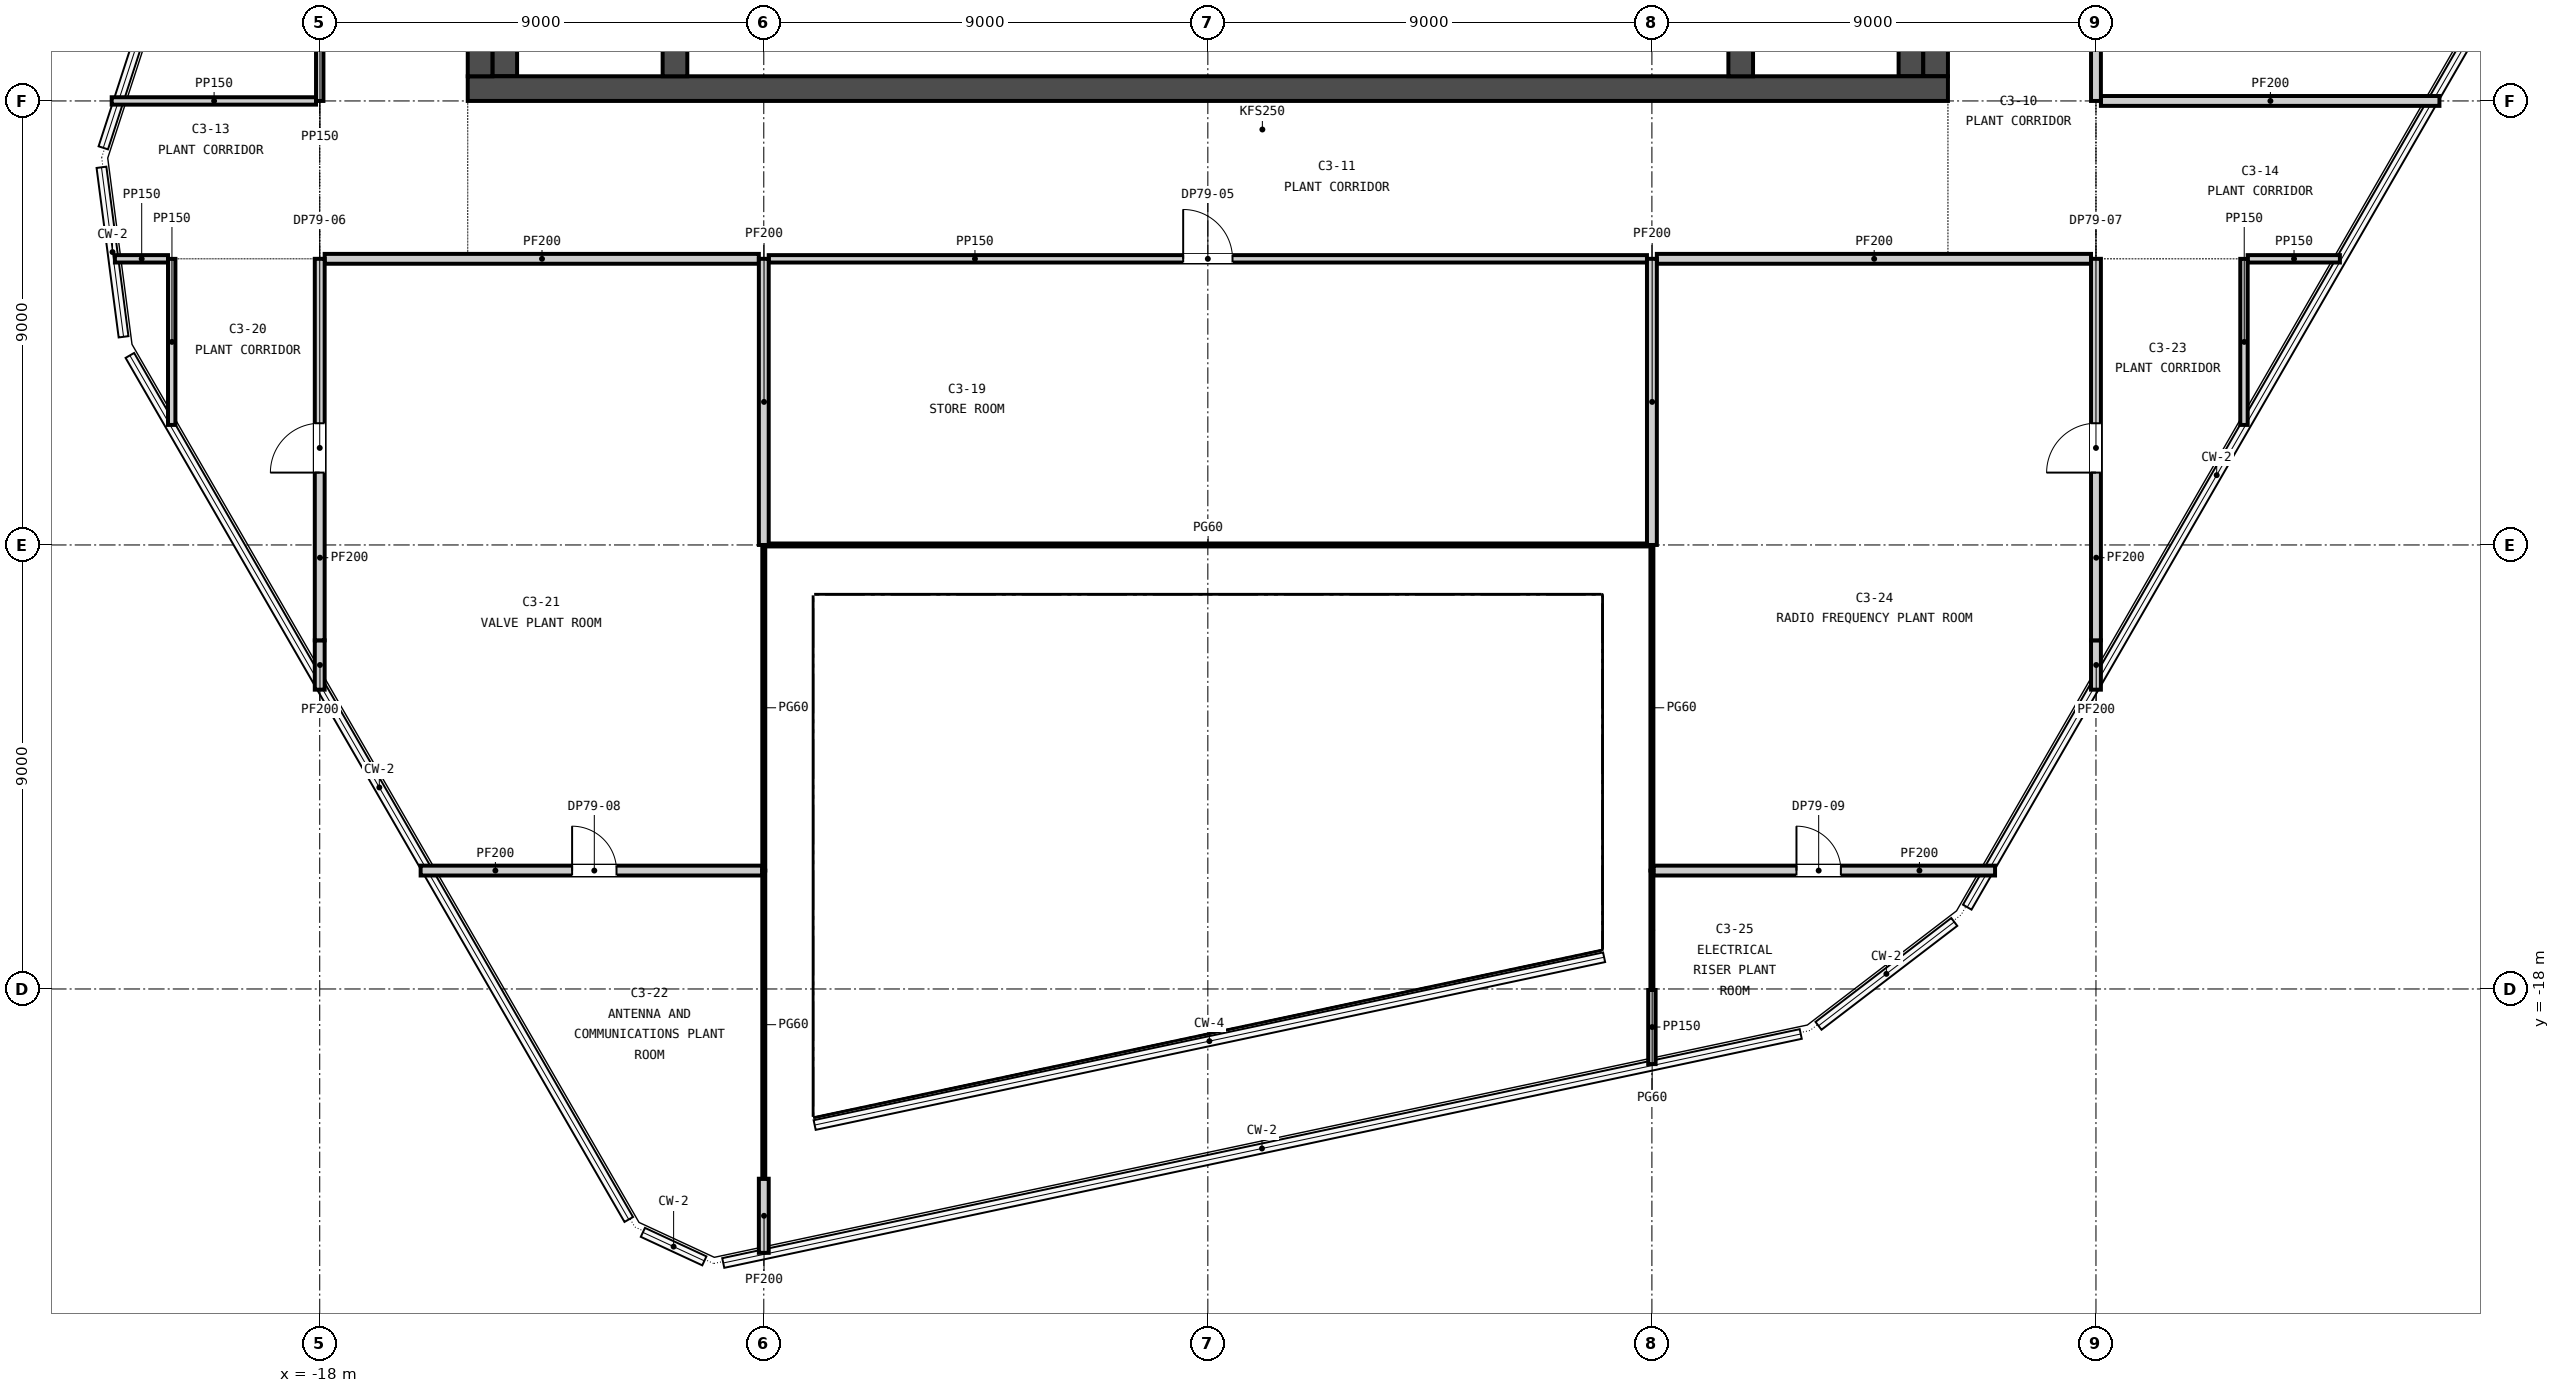
"""IFC4 building model, lengths in metres.
Left out: names, types, materials, properties, quantities, classifications, styles, units other than length and angle.
Written with IfcOpenShell. Run it as: python <this file> out.ifc"""

import sys

from ifc_helpers import new_model, si_unit, direction, frame, frame_2d, origin, place, context, subcontext, project, spatial, rectangle, extrude, element, fill, save


model = new_model("IFC4")
c1 = context("Model", 3, precision=1e-05, world=origin(), true_north=direction((0.0, 1.0)))
c2 = subcontext(c1, "Body", "Model", "MODEL_VIEW")
j1 = project(units=[si_unit("LENGTHUNIT", "METRE"), si_unit("PLANEANGLEUNIT", "RADIAN")], contexts=[c1])
p1 = place(None, origin())
s1 = spatial("IfcSite", under=j1, at=p1, CompositionType="ELEMENT")
p2 = place(p1, origin())
s2 = spatial("IfcBuilding", under=s1, at=p2, CompositionType="ELEMENT")
p3 = place(p2, frame((0.0, 0.0, 311.1)))
s3 = spatial("IfcBuildingStorey", under=s2, at=p3, CompositionType="ELEMENT", Elevation=311.1)
p4 = place(p3, frame((-15.0, 0.25, -0.25), z_axis=(0.0, 0.0, 1.0), x_axis=(1.0, 0.0, 0.0)))
e1 = element("IfcWall", 1, at=p4, inside=s3, PredefinedType="SOLIDWALL", context=c2, shape_type="SweptSolid", body=[
    extrude(rectangle(XDim=30.0, YDim=0.5, at=frame_2d((15.0, 0.0))), origin(), (0.0, 0.0, 1.0), 4.5),
])
for number, where, z_axis, x_axis in (
    (2, (-14.75, 0.5, -0.25), (0.0, 0.0, 1.0), (0.0, 1.0, 0.0)),
    (3, (14.75, 0.5, -0.25), (0.0, 0.0, 1.0), (0.0, 1.0, 0.0)),
    (4, (-10.8, 0.5, -0.25), (0.0, 0.0, 1.0), (0.0, 1.0, 0.0)),
    (5, (10.8, 0.5, -0.25), (0.0, 0.0, 1.0), (0.0, 1.0, 0.0)),
):
    element("IfcWall", number, at=place(p3, frame(where, z_axis=z_axis, x_axis=x_axis)), inside=s3, PredefinedType="SOLIDWALL", context=c2, shape_type="SweptSolid", body=[
        extrude(rectangle(XDim=14.0, YDim=0.5, at=frame_2d((7.0, 0.0))), origin(), (0.0, 0.0, 1.0), 4.5),
    ])
for number, where, z_axis, x_axis in (
    (6, (-14.25, 0.5, 0.0), (0.0, 0.0, 1.0), (0.0, 1.0, 0.0)),
    (7, (14.25, 0.5, 0.0), (0.0, 0.0, 1.0), (0.0, 1.0, 0.0)),
):
    element("IfcWall", number, at=place(p3, frame(where, z_axis=z_axis, x_axis=x_axis)), inside=s3, PredefinedType="SOLIDWALL", context=c2, shape_type="SweptSolid", body=[
        extrude(rectangle(XDim=14.0, YDim=0.5, at=frame_2d((7.0, 0.0))), origin(), (0.0, 0.0, 1.0), 4.25),
    ])
p5 = place(p3, frame((-15.955, -15.6, 0.0), z_axis=(0.0, 0.0, 1.0), x_axis=(1.0, 0.0, 0.0)))
e8 = element("IfcWall", 8, at=p5, inside=s3, PredefinedType="PARTITIONING", context=c2, shape_type="SweptSolid", body=[
    extrude(rectangle(XDim=6.925, YDim=0.2, at=frame_2d((3.462, 0.0))), origin(), (0.0, 0.0, 1.0), 4.25),
])
p6 = place(p5, frame((3.07, 0.0, 0.0)))
e9 = element("IfcOpeningElement", 9, at=p6, cuts=e8, PredefinedType="OPENING", context=c2, shape_type="SweptSolid", body=[
    extrude(rectangle(XDim=0.9, YDim=2.1, at=frame_2d((0.45, 1.05))), frame((0.0, 0.11, 0.0), z_axis=(0.0, -1.0, 0.0), x_axis=(1.0, 0.0, 0.0)), (0.0, 0.0, 1.0), 0.22),
])
p7 = place(p3, frame((9.03, -15.6, 0.0), z_axis=(0.0, 0.0, 1.0), x_axis=(1.0, 0.0, 0.0)))
e10 = element("IfcWall", 10, at=p7, inside=s3, PredefinedType="PARTITIONING", context=c2, shape_type="SweptSolid", body=[
    extrude(rectangle(XDim=6.925, YDim=0.2, at=frame_2d((3.462, 0.0))), origin(), (0.0, 0.0, 1.0), 4.25),
])
p8 = place(p7, frame((2.9, 0.0, 0.0)))
e11 = element("IfcOpeningElement", 11, at=p8, cuts=e10, PredefinedType="OPENING", context=c2, shape_type="SweptSolid", body=[
    extrude(rectangle(XDim=0.9, YDim=2.1, at=frame_2d((0.45, 1.05))), frame((0.0, 0.11, 0.0), z_axis=(0.0, -1.0, 0.0), x_axis=(1.0, 0.0, 0.0)), (0.0, 0.0, 1.0), 0.22),
])
p9 = place(p3, frame((-8.9, -9.0, 0.0), z_axis=(0.0, 0.0, 1.0), x_axis=(1.0, 0.0, 0.0)))
e12 = element("IfcWall", 12, at=p9, inside=s3, PredefinedType="PARTITIONING", context=c2, shape_type="SweptSolid", body=[
    extrude(rectangle(XDim=17.8, YDim=0.06, at=frame_2d((8.9, 0.0))), origin(), (0.0, 0.0, 1.0), 4.25),
])
p10 = place(p3, frame((-22.151, -3.2, 0.0), z_axis=(0.0, 0.0, 1.0), x_axis=(1.0, 0.0, 0.0)))
e13 = element("IfcWall", 13, at=p10, inside=s3, PredefinedType="PARTITIONING", context=c2, shape_type="SweptSolid", body=[
    extrude(rectangle(XDim=1.076, YDim=0.15, at=frame_2d((0.538, 0.0))), origin(), (0.0, 0.0, 1.0), 4.25),
])
p11 = place(p3, frame((-17.9, -3.2, 0.0), z_axis=(0.0, 0.0, 1.0), x_axis=(1.0, 0.0, 0.0)))
e14 = element("IfcWall", 14, at=p11, inside=s3, PredefinedType="PARTITIONING", context=c2, shape_type="SweptSolid", body=[
    extrude(rectangle(XDim=8.8, YDim=0.2, at=frame_2d((4.4, 0.0))), origin(), (0.0, 0.0, 1.0), 4.25),
])
p12 = place(p3, frame((-8.9, -3.2, 0.0), z_axis=(0.0, 0.0, 1.0), x_axis=(1.0, 0.0, 0.0)))
e15 = element("IfcWall", 15, at=p12, inside=s3, PredefinedType="PARTITIONING", context=c2, shape_type="SweptSolid", body=[
    extrude(rectangle(XDim=17.8, YDim=0.15, at=frame_2d((8.9, 0.0))), origin(), (0.0, 0.0, 1.0), 4.25),
])
p13 = place(p12, frame((8.4, 0.0, 0.0)))
e16 = element("IfcOpeningElement", 16, at=p13, cuts=e15, PredefinedType="OPENING", context=c2, shape_type="SweptSolid", body=[
    extrude(rectangle(XDim=1.0, YDim=2.1, at=frame_2d((0.5, 1.05))), frame((0.0, 0.085, 0.0), z_axis=(0.0, -1.0, 0.0), x_axis=(1.0, 0.0, 0.0)), (0.0, 0.0, 1.0), 0.17),
])
p14 = place(p3, frame((9.1, -3.2, 0.0), z_axis=(0.0, 0.0, 1.0), x_axis=(1.0, 0.0, 0.0)))
e17 = element("IfcWall", 17, at=p14, inside=s3, PredefinedType="PARTITIONING", context=c2, shape_type="SweptSolid", body=[
    extrude(rectangle(XDim=8.8, YDim=0.2, at=frame_2d((4.4, 0.0))), origin(), (0.0, 0.0, 1.0), 4.25),
])
p15 = place(p3, frame((21.075, -3.2, 0.0), z_axis=(0.0, 0.0, 1.0), x_axis=(1.0, 0.0, 0.0)))
e18 = element("IfcWall", 18, at=p15, inside=s3, PredefinedType="PARTITIONING", context=c2, shape_type="SweptSolid", body=[
    extrude(rectangle(XDim=1.869, YDim=0.15, at=frame_2d((0.935, 0.0))), origin(), (0.0, 0.0, 1.0), 4.25),
])
p16 = place(p3, frame((-22.216, 0.0, 0.0), z_axis=(0.0, 0.0, 1.0), x_axis=(1.0, 0.0, 0.0)))
e19 = element("IfcWall", 19, at=p16, inside=s3, PredefinedType="PARTITIONING", context=c2, shape_type="SweptSolid", body=[
    extrude(rectangle(XDim=4.141, YDim=0.15, at=frame_2d((2.071, 0.0))), origin(), (0.0, 0.0, 1.0), 4.25),
])
p17 = place(p3, frame((18.1, 0.0, 0.0), z_axis=(0.0, 0.0, 1.0), x_axis=(1.0, 0.0, 0.0)))
e20 = element("IfcWall", 20, at=p17, inside=s3, PredefinedType="PARTITIONING", context=c2, shape_type="SweptSolid", body=[
    extrude(rectangle(XDim=6.861, YDim=0.2, at=frame_2d((3.431, 0.0))), origin(), (0.0, 0.0, 1.0), 4.25),
])
p18 = place(p3, frame((-21.0, -6.567, 0.0), z_axis=(0.0, 0.0, 1.0), x_axis=(0.0, 1.0, 0.0)))
e21 = element("IfcWall", 21, at=p18, inside=s3, PredefinedType="PARTITIONING", context=c2, shape_type="SweptSolid", body=[
    extrude(rectangle(XDim=3.366, YDim=0.15, at=frame_2d((1.683, 0.0))), origin(), (0.0, 0.0, 1.0), 4.25),
])
p19 = place(p3, frame((-18.0, -11.933, 0.0), z_axis=(0.0, 0.0, 1.0), x_axis=(0.0, 1.0, 0.0)))
e22 = element("IfcWall", 22, at=p19, inside=s3, PredefinedType="PARTITIONING", context=c2, shape_type="SweptSolid", body=[
    extrude(rectangle(XDim=1.0, YDim=0.2, at=frame_2d((0.5, 0.0))), origin(), (0.0, 0.0, 1.0), 3.634),
])
p20 = place(p3, frame((-18.0, -10.933, 0.0), z_axis=(0.0, 0.0, 1.0), x_axis=(0.0, 1.0, 0.0)))
e23 = element("IfcWall", 23, at=p20, inside=s3, PredefinedType="PARTITIONING", context=c2, shape_type="SweptSolid", body=[
    extrude(rectangle(XDim=7.733, YDim=0.2, at=frame_2d((3.867, 0.0))), origin(), (0.0, 0.0, 1.0), 4.25),
])
p21 = place(p20, frame((3.4, 0.0, 0.0)))
e24 = element("IfcOpeningElement", 24, at=p21, cuts=e23, PredefinedType="OPENING", context=c2, shape_type="SweptSolid", body=[
    extrude(rectangle(XDim=1.0, YDim=2.1, at=frame_2d((0.5, 1.05))), frame((0.0, 0.11, 0.0), z_axis=(0.0, -1.0, 0.0), x_axis=(1.0, 0.0, 0.0)), (0.0, 0.0, 1.0), 0.22),
])
p22 = place(p3, frame((-18.0, 0.0, 0.0), z_axis=(0.0, 0.0, 1.0), x_axis=(0.0, 1.0, 0.0)))
e25 = element("IfcWall", 25, at=p22, inside=s3, PredefinedType="PARTITIONING", context=c2, shape_type="SweptSolid", body=[
    extrude(rectangle(XDim=11.624, YDim=0.15, at=frame_2d((5.812, 0.0))), origin(), (0.0, 0.0, 1.0), 4.25),
])
p23 = place(p22, frame((5.4, 0.0, 0.0)))
e26 = element("IfcOpeningElement", 26, at=p23, cuts=e25, PredefinedType="OPENING", context=c2, shape_type="SweptSolid", body=[
    extrude(rectangle(XDim=1.0, YDim=2.1, at=frame_2d((0.5, 1.05))), frame((0.0, 0.085, 0.0), z_axis=(0.0, -1.0, 0.0), x_axis=(1.0, 0.0, 0.0)), (0.0, 0.0, 1.0), 0.17),
])
p24 = place(p3, frame((-9.0, -23.349, 0.0), z_axis=(0.0, 0.0, 1.0), x_axis=(0.0, 1.0, 0.0)))
e27 = element("IfcWall", 27, at=p24, inside=s3, PredefinedType="PARTITIONING", context=c2, shape_type="SweptSolid", body=[
    extrude(rectangle(XDim=1.503, YDim=0.2, at=frame_2d((0.751, 0.0))), origin(), (0.0, 0.0, 1.0), 4.25),
])
p25 = place(p3, frame((-9.0, -21.846, 0.0), z_axis=(0.0, 0.0, 1.0), x_axis=(0.0, 1.0, 0.0)))
e28 = element("IfcWall", 28, at=p25, inside=s3, PredefinedType="PARTITIONING", context=c2, shape_type="SweptSolid", body=[
    extrude(rectangle(XDim=6.245, YDim=0.06, at=frame_2d((3.123, 0.0))), origin(), (0.0, 0.0, 1.0), 4.25),
])
p26 = place(p3, frame((-9.0, -15.599, 0.0), z_axis=(0.0, 0.0, 1.0), x_axis=(0.0, 1.0, 0.0)))
e29 = element("IfcWall", 29, at=p26, inside=s3, PredefinedType="PARTITIONING", context=c2, shape_type="SweptSolid", body=[
    extrude(rectangle(XDim=6.598, YDim=0.06, at=frame_2d((3.299, 0.0))), origin(), (0.0, 0.0, 1.0), 4.25),
])
p27 = place(p3, frame((-9.0, -9.0, 0.0), z_axis=(0.0, 0.0, 1.0), x_axis=(0.0, 1.0, 0.0)))
e30 = element("IfcWall", 30, at=p27, inside=s3, PredefinedType="PARTITIONING", context=c2, shape_type="SweptSolid", body=[
    extrude(rectangle(XDim=5.8, YDim=0.2, at=frame_2d((2.9, 0.0))), origin(), (0.0, 0.0, 1.0), 4.25),
])
p28 = place(p3, frame((9.0, -19.523, 0.0), z_axis=(0.0, 0.0, 1.0), x_axis=(0.0, 1.0, 0.0)))
e31 = element("IfcWall", 31, at=p28, inside=s3, PredefinedType="PARTITIONING", context=c2, shape_type="SweptSolid", body=[
    extrude(rectangle(XDim=1.503, YDim=0.15, at=frame_2d((0.751, 0.0))), origin(), (0.0, 0.0, 1.0), 4.25),
])
p29 = place(p3, frame((9.0, -18.02, 0.0), z_axis=(0.0, 0.0, 1.0), x_axis=(0.0, 1.0, 0.0)))
e32 = element("IfcWall", 32, at=p29, inside=s3, PredefinedType="PARTITIONING", context=c2, shape_type="SweptSolid", body=[
    extrude(rectangle(XDim=2.419, YDim=0.06, at=frame_2d((1.209, 0.0))), origin(), (0.0, 0.0, 1.0), 4.25),
])
p30 = place(p3, frame((9.0, -15.599, 0.0), z_axis=(0.0, 0.0, 1.0), x_axis=(0.0, 1.0, 0.0)))
e33 = element("IfcWall", 33, at=p30, inside=s3, PredefinedType="PARTITIONING", context=c2, shape_type="SweptSolid", body=[
    extrude(rectangle(XDim=6.598, YDim=0.06, at=frame_2d((3.299, 0.0))), origin(), (0.0, 0.0, 1.0), 4.25),
])
p31 = place(p3, frame((9.0, -9.0, 0.0), z_axis=(0.0, 0.0, 1.0), x_axis=(0.0, 1.0, 0.0)))
e34 = element("IfcWall", 34, at=p31, inside=s3, PredefinedType="PARTITIONING", context=c2, shape_type="SweptSolid", body=[
    extrude(rectangle(XDim=5.8, YDim=0.2, at=frame_2d((2.9, 0.0))), origin(), (0.0, 0.0, 1.0), 4.25),
])
p32 = place(p3, frame((18.0, -11.933, 0.0), z_axis=(0.0, 0.0, 1.0), x_axis=(0.0, 1.0, 0.0)))
e35 = element("IfcWall", 35, at=p32, inside=s3, PredefinedType="PARTITIONING", context=c2, shape_type="SweptSolid", body=[
    extrude(rectangle(XDim=1.0, YDim=0.2, at=frame_2d((0.5, 0.0))), origin(), (0.0, 0.0, 1.0), 3.634),
])
p33 = place(p3, frame((18.0, -10.933, 0.0), z_axis=(0.0, 0.0, 1.0), x_axis=(0.0, 1.0, 0.0)))
e36 = element("IfcWall", 36, at=p33, inside=s3, PredefinedType="PARTITIONING", context=c2, shape_type="SweptSolid", body=[
    extrude(rectangle(XDim=7.733, YDim=0.2, at=frame_2d((3.867, 0.0))), origin(), (0.0, 0.0, 1.0), 4.25),
])
p34 = place(p33, frame((3.4, 0.0, 0.0)))
e37 = element("IfcOpeningElement", 37, at=p34, cuts=e36, PredefinedType="OPENING", context=c2, shape_type="SweptSolid", body=[
    extrude(rectangle(XDim=1.0, YDim=2.1, at=frame_2d((0.5, 1.05))), frame((0.0, 0.11, 0.0), z_axis=(0.0, -1.0, 0.0), x_axis=(1.0, 0.0, 0.0)), (0.0, 0.0, 1.0), 0.22),
])
p35 = place(p3, frame((18.0, 0.0, 0.0), z_axis=(0.0, 0.0, 1.0), x_axis=(0.0, 1.0, 0.0)))
e38 = element("IfcWall", 38, at=p35, inside=s3, PredefinedType="PARTITIONING", context=c2, shape_type="SweptSolid", body=[
    extrude(rectangle(XDim=11.514, YDim=0.2, at=frame_2d((5.757, 0.0))), origin(), (0.0, 0.0, 1.0), 4.25),
])
p36 = place(p35, frame((5.15, 0.0, 0.0)))
e39 = element("IfcOpeningElement", 39, at=p36, cuts=e38, PredefinedType="OPENING", context=c2, shape_type="SweptSolid", body=[
    extrude(rectangle(XDim=1.0, YDim=2.1, at=frame_2d((0.5, 1.05))), frame((0.0, 0.11, 0.0), z_axis=(0.0, -1.0, 0.0), x_axis=(1.0, 0.0, 0.0)), (0.0, 0.0, 1.0), 0.22),
])
p37 = place(p3, frame((21.0, -6.567, 0.0), z_axis=(0.0, 0.0, 1.0), x_axis=(0.0, 1.0, 0.0)))
e40 = element("IfcWall", 40, at=p37, inside=s3, PredefinedType="PARTITIONING", context=c2, shape_type="SweptSolid", body=[
    extrude(rectangle(XDim=3.366, YDim=0.15, at=frame_2d((1.683, 0.0))), origin(), (0.0, 0.0, 1.0), 4.25),
])
p38 = place(p13, origin())
e41 = element("IfcDoor", 41, at=p38, inside=s3, OperationType="SINGLE_SWING_LEFT", PredefinedType="DOOR", context=c2, shape_type="SweptSolid", body=[
    extrude(rectangle(XDim=1.0, YDim=2.1, at=frame_2d((0.5, 1.05))), frame((0.0, 0.025, 0.0), z_axis=(0.0, -1.0, 0.0), x_axis=(1.0, 0.0, 0.0)), (0.0, 0.0, 1.0), 0.05),
])
fill(e16, e41)
p39 = place(p21, origin())
e42 = element("IfcDoor", 42, at=p39, inside=s3, OperationType="SINGLE_SWING_LEFT", PredefinedType="DOOR", context=c2, shape_type="SweptSolid", body=[
    extrude(rectangle(XDim=1.0, YDim=2.1, at=frame_2d((0.5, 1.05))), frame((0.0, 0.025, 0.0), z_axis=(0.0, -1.0, 0.0), x_axis=(1.0, 0.0, 0.0)), (0.0, 0.0, 1.0), 0.05),
])
fill(e24, e42)
p40 = place(p34, origin())
e43 = element("IfcDoor", 43, at=p40, inside=s3, OperationType="SINGLE_SWING_LEFT", PredefinedType="DOOR", context=c2, shape_type="SweptSolid", body=[
    extrude(rectangle(XDim=1.0, YDim=2.1, at=frame_2d((0.5, 1.05))), frame((0.0, 0.025, 0.0), z_axis=(0.0, -1.0, 0.0), x_axis=(1.0, 0.0, 0.0)), (0.0, 0.0, 1.0), 0.05),
])
fill(e37, e43)
p41 = place(p6, origin())
e44 = element("IfcDoor", 44, at=p41, inside=s3, OperationType="SINGLE_SWING_LEFT", PredefinedType="DOOR", context=c2, shape_type="SweptSolid", body=[
    extrude(rectangle(XDim=0.9, YDim=2.1, at=frame_2d((0.45, 1.05))), frame((0.0, 0.025, 0.0), z_axis=(0.0, -1.0, 0.0), x_axis=(1.0, 0.0, 0.0)), (0.0, 0.0, 1.0), 0.05),
])
fill(e9, e44)
p42 = place(p8, origin())
e45 = element("IfcDoor", 45, at=p42, inside=s3, OperationType="SINGLE_SWING_LEFT", PredefinedType="DOOR", context=c2, shape_type="SweptSolid", body=[
    extrude(rectangle(XDim=0.9, YDim=2.1, at=frame_2d((0.45, 1.05))), frame((0.0, 0.025, 0.0), z_axis=(0.0, -1.0, 0.0), x_axis=(1.0, 0.0, 0.0)), (0.0, 0.0, 1.0), 0.05),
])
fill(e11, e45)
save(model, sys.argv[1])
